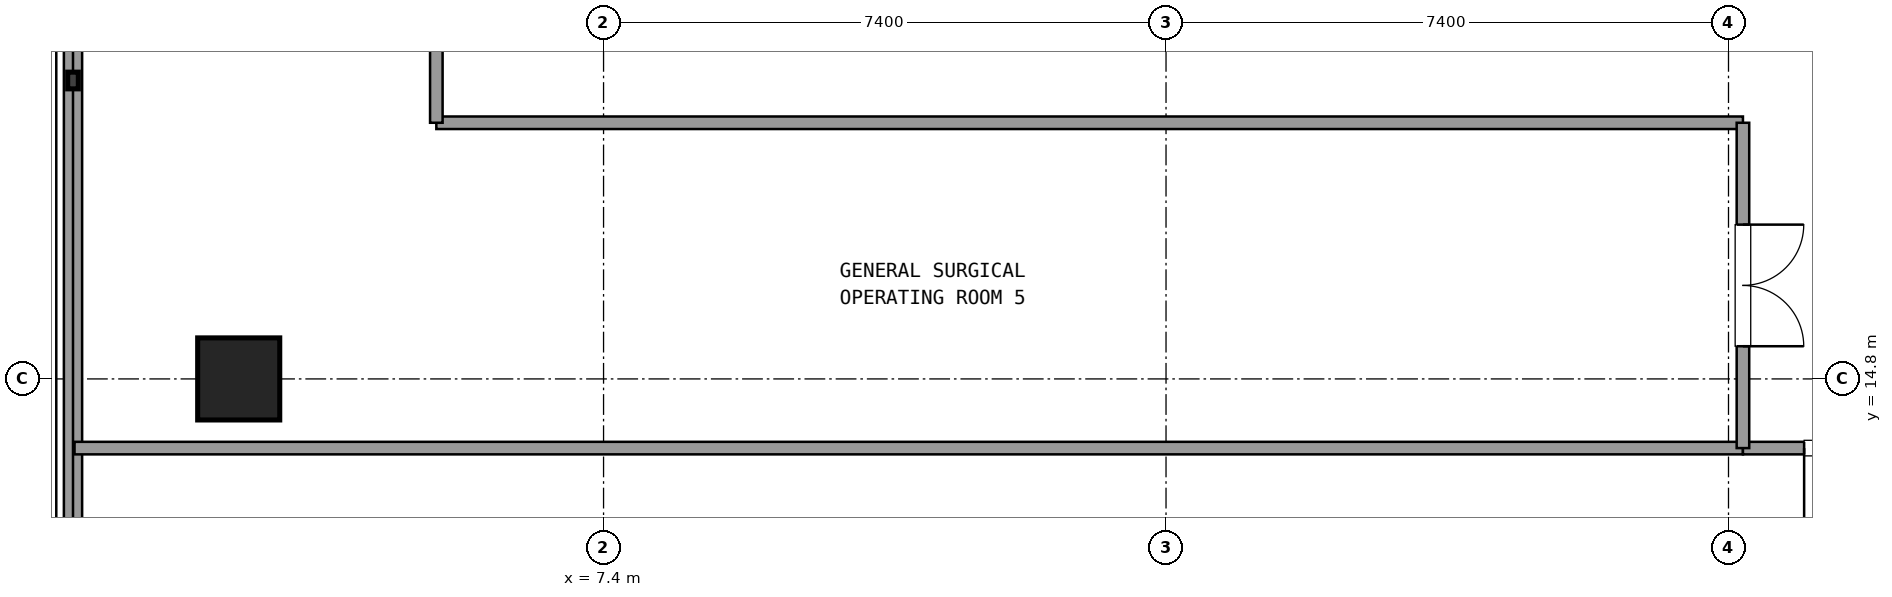
"""IFC4 building model, lengths in metres.
Left out: names, types, materials, properties, quantities, classifications, styles, units other than length and angle.
Written with IfcOpenShell. Run it as: python <this file> out.ifc"""

import sys

from ifc_helpers import new_model, si_unit, direction, frame, frame_2d, origin, origin_2d, place, context, subcontext, project, spatial, rectangle, extrude, element, fill, save


model = new_model("IFC4")
c1 = context("Model", 3, precision=1e-05, world=origin(), true_north=direction((0.0, 1.0)))
c2 = subcontext(c1, "Body", "Model", "MODEL_VIEW")
j1 = project(units=[si_unit("LENGTHUNIT", "METRE"), si_unit("PLANEANGLEUNIT", "RADIAN")], contexts=[c1])
p1 = place(None, origin())
s1 = spatial("IfcSite", under=j1, at=p1, CompositionType="ELEMENT")
p2 = place(p1, origin())
s2 = spatial("IfcBuilding", under=s1, at=p2, CompositionType="ELEMENT")
p3 = place(p2, frame((0.0, 0.0, 18.9)))
s3 = spatial("IfcBuildingStorey", under=s2, at=p3, CompositionType="ELEMENT", Elevation=18.9)
p4 = place(p3, frame((2.6, 14.8, 0.0), z_axis=(0.0, 0.0, 1.0), x_axis=(1.0, 0.0, 0.0)))
e1 = element("IfcColumn", 1, at=p4, inside=s3, PredefinedType="COLUMN", context=c2, shape_type="SweptSolid", body=[
    extrude(rectangle(XDim=1.08, YDim=1.08, at=origin_2d()), origin(), (0.0, 0.0, 1.0), 5.04),
])
p5 = place(p3, frame((0.42, 47.421, 0.0), z_axis=(0.0, 0.0, 1.0), x_axis=(0.0, -1.0, 0.0)))
e2 = element("IfcWall", 2, at=p5, inside=s3, PredefinedType="SOLIDWALL", context=c2, shape_type="SweptSolid", body=[
    extrude(rectangle(XDim=43.042, YDim=0.24, at=frame_2d((21.521, 0.0))), origin(), (0.0, 0.0, 1.0), 0.85),
])
p6 = place(p3, frame((0.44, 13.89, 0.0), z_axis=(0.0, 0.0, 1.0), x_axis=(1.0, 0.0, 0.0)))
e3 = element("IfcWall", 3, at=p6, inside=s3, PredefinedType="PARTITIONING", context=c2, shape_type="SweptSolid", body=[
    extrude(rectangle(XDim=21.95, YDim=0.165, at=frame_2d((10.975, 0.0))), origin(), (0.0, 0.0, 1.0), 3.13),
])
p7 = place(p3, frame((5.2, 18.17, 0.0), z_axis=(0.0, 0.0, 1.0), x_axis=(1.0, 0.0, 0.0)))
e4 = element("IfcWall", 4, at=p7, inside=s3, PredefinedType="PARTITIONING", context=c2, shape_type="SweptSolid", body=[
    extrude(rectangle(XDim=17.19, YDim=0.165, at=frame_2d((8.595, 0.0))), origin(), (0.0, 0.0, 1.0), 3.13),
])
p8 = place(p3, frame((5.2, 18.17, 0.0), z_axis=(0.0, 0.0, 1.0), x_axis=(0.0, 1.0, 0.0)))
e5 = element("IfcWall", 5, at=p8, inside=s3, PredefinedType="PARTITIONING", context=c2, shape_type="SweptSolid", body=[
    extrude(rectangle(XDim=2.93, YDim=0.165, at=frame_2d((1.465, 0.0))), origin(), (0.0, 0.0, 1.0), 3.13),
])
p9 = place(p3, frame((22.39, 13.89, 0.0), z_axis=(0.0, 0.0, 1.0), x_axis=(1.0, 0.0, 0.0)))
e6 = element("IfcWall", 6, at=p9, inside=s3, PredefinedType="PARTITIONING", context=c2, shape_type="SweptSolid", body=[
    extrude(rectangle(XDim=2.81, YDim=0.165, at=frame_2d((1.405, 0.0))), origin(), (0.0, 0.0, 1.0), 3.13),
])
p10 = place(p9, frame((0.805, 0.0, 0.0)))
e7 = element("IfcOpeningElement", 7, at=p10, cuts=e6, PredefinedType="OPENING", context=c2, shape_type="SweptSolid", body=[
    extrude(rectangle(XDim=1.2, YDim=2.15, at=frame_2d((0.6, 1.075))), frame((0.0, 0.093, 0.0), z_axis=(0.0, -1.0, 0.0), x_axis=(1.0, 0.0, 0.0)), (0.0, 0.0, 1.0), 0.185),
])
p11 = place(p3, frame((22.39, 13.89, 0.0), z_axis=(0.0, 0.0, 1.0), x_axis=(0.0, 1.0, 0.0)))
e8 = element("IfcWall", 8, at=p11, inside=s3, PredefinedType="PARTITIONING", context=c2, shape_type="SweptSolid", body=[
    extrude(rectangle(XDim=4.28, YDim=0.165, at=frame_2d((2.14, 0.0))), origin(), (0.0, 0.0, 1.0), 3.13),
])
p12 = place(p11, frame((1.34, 0.0, 0.0)))
e9 = element("IfcOpeningElement", 9, at=p12, cuts=e8, PredefinedType="OPENING", context=c2, shape_type="SweptSolid", body=[
    extrude(rectangle(XDim=1.6, YDim=2.2, at=frame_2d((0.8, 1.1))), frame((0.0, 0.093, 0.0), z_axis=(0.0, -1.0, 0.0), x_axis=(1.0, 0.0, 0.0)), (0.0, 0.0, 1.0), 0.185),
])
p13 = place(p10, frame((1.2, 0.0, 0.0), z_axis=(0.0, 0.0, 1.0), x_axis=(-1.0, 0.0, 0.0)))
e10 = element("IfcDoor", 10, at=p13, inside=s3, OperationType="SINGLE_SWING_LEFT", PredefinedType="DOOR", context=c2, shape_type="SweptSolid", body=[
    extrude(rectangle(XDim=1.2, YDim=2.15, at=frame_2d((0.6, 1.075))), frame((0.0, 0.025, 0.0), z_axis=(0.0, -1.0, 0.0), x_axis=(1.0, 0.0, 0.0)), (0.0, 0.0, 1.0), 0.05),
])
fill(e7, e10)
p14 = place(p12, frame((1.6, 0.0, 0.0), z_axis=(0.0, 0.0, 1.0), x_axis=(-1.0, 0.0, 0.0)))
e11 = element("IfcDoor", 11, at=p14, inside=s3, OperationType="DOUBLE_DOOR_SINGLE_SWING", PredefinedType="DOOR", context=c2, shape_type="SweptSolid", body=[
    extrude(rectangle(XDim=1.6, YDim=2.2, at=frame_2d((0.8, 1.1))), frame((0.0, 0.025, 0.0), z_axis=(0.0, -1.0, 0.0), x_axis=(1.0, 0.0, 0.0)), (0.0, 0.0, 1.0), 0.05),
])
fill(e9, e11)
save(model, sys.argv[1])
